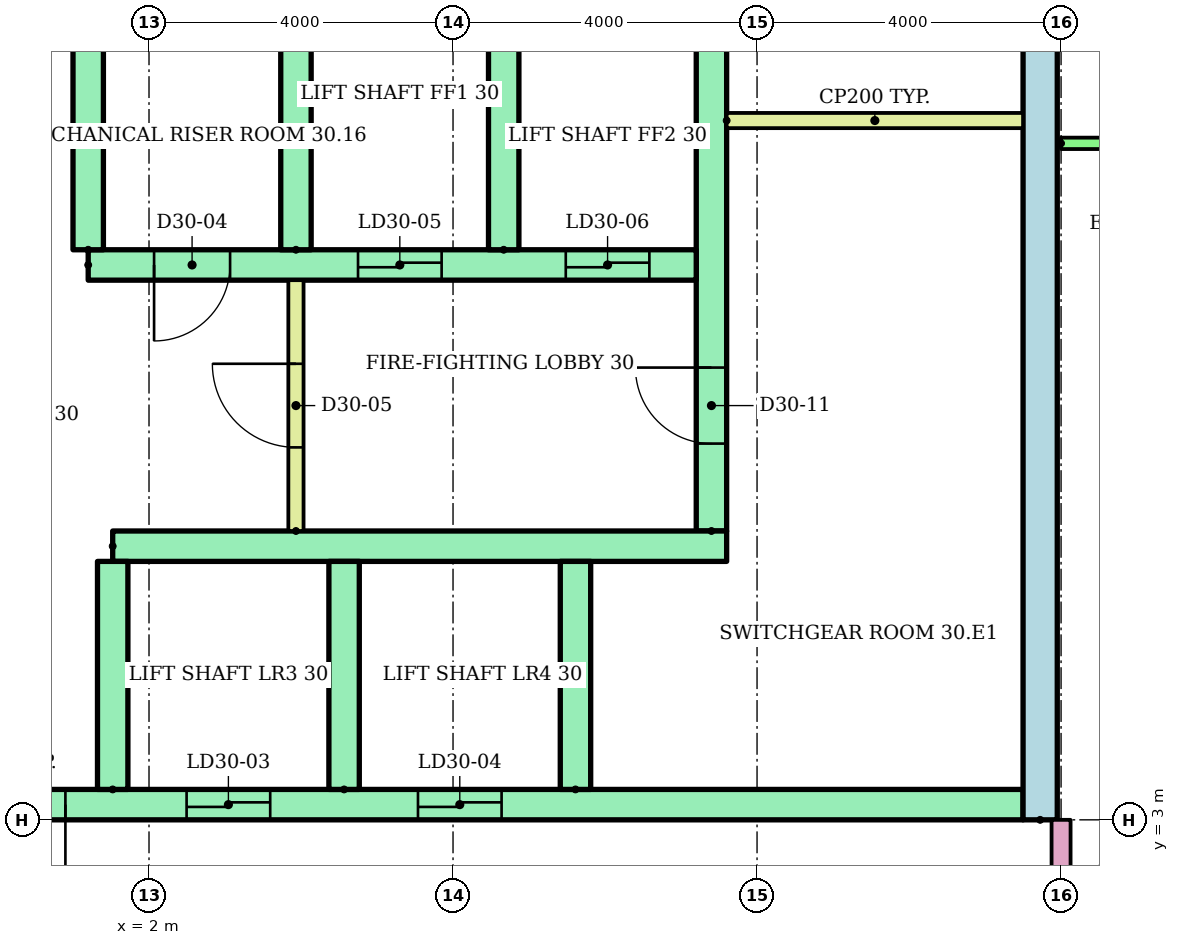
"""IFC4 building model, lengths in metres.
Left out: names, types, materials, properties, quantities, classifications, styles, units other than length and angle.
Written with IfcOpenShell. Run it as: python <this file> out.ifc"""

import sys

from ifc_helpers import new_model, si_unit, direction, frame, frame_2d, origin, place, context, subcontext, project, spatial, rectangle, extrude, element, fill, save


model = new_model("IFC4")
c1 = context("Model", 3, precision=1e-05, world=origin(), true_north=direction((0.0, 1.0)))
c2 = subcontext(c1, "Body", "Model", "MODEL_VIEW")
j1 = project(units=[si_unit("LENGTHUNIT", "METRE"), si_unit("PLANEANGLEUNIT", "RADIAN")], contexts=[c1])
p1 = place(None, origin())
s1 = spatial("IfcSite", under=j1, at=p1, CompositionType="ELEMENT")
p2 = place(p1, origin())
s2 = spatial("IfcBuilding", under=s1, at=p2, CompositionType="ELEMENT")
p3 = place(p2, frame((0.0, 0.0, 119.8)))
s3 = spatial("IfcBuildingStorey", under=s2, at=p3, CompositionType="ELEMENT", Elevation=119.8)
p4 = place(p3, frame((13.725, 3.0, 0.0), z_axis=(0.0, 0.0, 1.0), x_axis=(0.0, 1.0, 0.0)))
e1 = element("IfcWall", 1, at=p4, inside=s3, PredefinedType="SHEAR", context=c2, shape_type="SweptSolid", body=[
    extrude(rectangle(XDim=17.0, YDim=0.45, at=frame_2d((8.5, 0.0))), origin(), (0.0, 0.0, 1.0), 2.92),
])
p5 = place(p3, frame((9.4, 6.8, 0.0), z_axis=(0.0, 0.0, 1.0), x_axis=(0.0, 1.0, 0.0)))
e2 = element("IfcWall", 2, at=p5, inside=s3, PredefinedType="SHEAR", context=c2, shape_type="SweptSolid", body=[
    extrude(rectangle(XDim=12.7, YDim=0.4, at=frame_2d((6.35, 0.0))), origin(), (0.0, 0.0, 1.0), 2.92),
])
p6 = place(p5, frame((1.15, 0.0, 0.0)))
e3 = element("IfcOpeningElement", 3, at=p6, cuts=e2, PredefinedType="OPENING", context=c2, shape_type="SweptSolid", body=[
    extrude(rectangle(XDim=1.0, YDim=2.1, at=frame_2d((0.5, 1.05))), frame((0.0, 0.21, 0.0), z_axis=(0.0, -1.0, 0.0), x_axis=(1.0, 0.0, 0.0)), (0.0, 0.0, 1.0), 0.42),
])
p7 = place(p5, frame((7.925, 0.0, 0.0)))
e4 = element("IfcOpeningElement", 4, at=p7, cuts=e2, PredefinedType="OPENING", context=c2, shape_type="SweptSolid", body=[
    extrude(rectangle(XDim=1.0, YDim=2.1, at=frame_2d((0.5, 1.05))), frame((0.0, 0.21, 0.0), z_axis=(0.0, -1.0, 0.0), x_axis=(1.0, 0.0, 0.0)), (0.0, 0.0, 1.0), 0.42),
])
p8 = place(p3, frame((-13.5, 3.2, 0.0)))
e5 = element("IfcWall", 5, at=p8, inside=s3, PredefinedType="SHEAR", context=c2, shape_type="SweptSolid", body=[
    extrude(rectangle(XDim=27.0, YDim=0.4, at=frame_2d((13.5, 0.0))), origin(), (0.0, 0.0, 1.0), 2.92),
])
p9 = place(p8, frame((6.861, 0.0, 0.0)))
e6 = element("IfcOpeningElement", 6, at=p9, cuts=e5, PredefinedType="OPENING", context=c2, shape_type="SweptSolid", body=[
    extrude(rectangle(XDim=1.1, YDim=2.1, at=frame_2d((0.55, 1.05))), frame((0.0, 0.21, 0.0), z_axis=(0.0, -1.0, 0.0), x_axis=(1.0, 0.0, 0.0)), (0.0, 0.0, 1.0), 0.42),
])
p10 = place(p8, frame((9.906, 0.0, 0.0)))
e7 = element("IfcOpeningElement", 7, at=p10, cuts=e5, PredefinedType="OPENING", context=c2, shape_type="SweptSolid", body=[
    extrude(rectangle(XDim=1.1, YDim=2.1, at=frame_2d((0.55, 1.05))), frame((0.0, 0.21, 0.0), z_axis=(0.0, -1.0, 0.0), x_axis=(1.0, 0.0, 0.0)), (0.0, 0.0, 1.0), 0.42),
])
p11 = place(p8, frame((15.994, 0.0, 0.0)))
e8 = element("IfcOpeningElement", 8, at=p11, cuts=e5, PredefinedType="OPENING", context=c2, shape_type="SweptSolid", body=[
    extrude(rectangle(XDim=1.1, YDim=2.1, at=frame_2d((0.55, 1.05))), frame((0.0, 0.21, 0.0), z_axis=(0.0, -1.0, 0.0), x_axis=(1.0, 0.0, 0.0)), (0.0, 0.0, 1.0), 0.42),
])
p12 = place(p8, frame((19.039, 0.0, 0.0)))
e9 = element("IfcOpeningElement", 9, at=p12, cuts=e5, PredefinedType="OPENING", context=c2, shape_type="SweptSolid", body=[
    extrude(rectangle(XDim=1.1, YDim=2.1, at=frame_2d((0.55, 1.05))), frame((0.0, 0.21, 0.0), z_axis=(0.0, -1.0, 0.0), x_axis=(1.0, 0.0, 0.0)), (0.0, 0.0, 1.0), 0.42),
])
p13 = place(p8, frame((12.6, 0.0, 0.0)))
e10 = element("IfcOpeningElement", 10, at=p13, cuts=e5, PredefinedType="OPENING", context=c2, shape_type="SweptSolid", body=[
    extrude(rectangle(XDim=1.8, YDim=2.1, at=frame_2d((0.9, 1.05))), frame((0.0, 0.21, 0.0), z_axis=(0.0, -1.0, 0.0), x_axis=(1.0, 0.0, 0.0)), (0.0, 0.0, 1.0), 0.42),
])
p14 = place(p3, frame((1.522, 6.6, 0.0)))
e11 = element("IfcWall", 11, at=p14, inside=s3, PredefinedType="SHEAR", context=c2, shape_type="SweptSolid", body=[
    extrude(rectangle(XDim=8.078, YDim=0.4, at=frame_2d((4.039, 0.0))), origin(), (0.0, 0.0, 1.0), 2.92),
])
for number, where, z_axis, x_axis in (
    (12, (1.522, 3.4, 0.0), (0.0, 0.0, 1.0), (0.0, 1.0, 0.0)),
    (13, (4.567, 3.4, 0.0), (0.0, 0.0, 1.0), (0.0, 1.0, 0.0)),
    (14, (7.611, 3.4, 0.0), (0.0, 0.0, 1.0), (0.0, 1.0, 0.0)),
):
    element("IfcWall", number, at=place(p3, frame(where, z_axis=z_axis, x_axis=x_axis)), inside=s3, PredefinedType="SHEAR", context=c2, shape_type="SweptSolid", body=[
        extrude(rectangle(XDim=3.0, YDim=0.4, at=frame_2d((1.5, 0.0))), origin(), (0.0, 0.0, 1.0), 2.92),
    ])
p15 = place(p3, frame((1.2, 10.3, 0.0)))
e15 = element("IfcWall", 15, at=p15, inside=s3, PredefinedType="SHEAR", context=c2, shape_type="SweptSolid", body=[
    extrude(rectangle(XDim=8.0, YDim=0.4, at=frame_2d((4.0, 0.0))), origin(), (0.0, 0.0, 1.0), 2.92),
])
p16 = place(p15, frame((3.55, 0.0, 0.0)))
e16 = element("IfcOpeningElement", 16, at=p16, cuts=e15, PredefinedType="OPENING", context=c2, shape_type="SweptSolid", body=[
    extrude(rectangle(XDim=1.1, YDim=2.1, at=frame_2d((0.55, 1.05))), frame((0.0, 0.21, 0.0), z_axis=(0.0, -1.0, 0.0), x_axis=(1.0, 0.0, 0.0)), (0.0, 0.0, 1.0), 0.42),
])
p17 = place(p15, frame((6.283, 0.0, 0.0)))
e17 = element("IfcOpeningElement", 17, at=p17, cuts=e15, PredefinedType="OPENING", context=c2, shape_type="SweptSolid", body=[
    extrude(rectangle(XDim=1.1, YDim=2.1, at=frame_2d((0.55, 1.05))), frame((0.0, 0.21, 0.0), z_axis=(0.0, -1.0, 0.0), x_axis=(1.0, 0.0, 0.0)), (0.0, 0.0, 1.0), 0.42),
])
p18 = place(p15, frame((0.867, 0.0, 0.0)))
e18 = element("IfcOpeningElement", 18, at=p18, cuts=e15, PredefinedType="OPENING", context=c2, shape_type="SweptSolid", body=[
    extrude(rectangle(XDim=1.0, YDim=2.1, at=frame_2d((0.5, 1.05))), frame((0.0, 0.21, 0.0), z_axis=(0.0, -1.0, 0.0), x_axis=(1.0, 0.0, 0.0)), (0.0, 0.0, 1.0), 0.42),
])
for number, where, z_axis, x_axis in (
    (19, (1.2, 10.5, 0.0), (0.0, 0.0, 1.0), (0.0, 1.0, 0.0)),
    (20, (3.933, 10.5, 0.0), (0.0, 0.0, 1.0), (0.0, 1.0, 0.0)),
    (21, (6.667, 10.5, 0.0), (0.0, 0.0, 1.0), (0.0, 1.0, 0.0)),
):
    element("IfcWall", number, at=place(p3, frame(where, z_axis=z_axis, x_axis=x_axis)), inside=s3, PredefinedType="SHEAR", context=c2, shape_type="SweptSolid", body=[
        extrude(rectangle(XDim=3.0, YDim=0.4, at=frame_2d((1.5, 0.0))), origin(), (0.0, 0.0, 1.0), 2.92),
    ])
p19 = place(p3, frame((3.933, 6.8, 0.0), z_axis=(0.0, 0.0, 1.0), x_axis=(0.0, 1.0, 0.0)))
e22 = element("IfcWall", 22, at=p19, inside=s3, PredefinedType="PARTITIONING", context=c2, shape_type="SweptSolid", body=[
    extrude(rectangle(XDim=3.3, YDim=0.2, at=frame_2d((1.65, 0.0))), origin(), (0.0, 0.0, 1.0), 2.92),
])
p20 = place(p19, frame((1.1, 0.0, 0.0)))
e23 = element("IfcOpeningElement", 23, at=p20, cuts=e22, PredefinedType="OPENING", context=c2, shape_type="SweptSolid", body=[
    extrude(rectangle(XDim=1.1, YDim=2.1, at=frame_2d((0.55, 1.05))), frame((0.0, 0.11, 0.0), z_axis=(0.0, -1.0, 0.0), x_axis=(1.0, 0.0, 0.0)), (0.0, 0.0, 1.0), 0.22),
])
p21 = place(p3, frame((9.6, 12.2, 0.0)))
e24 = element("IfcWall", 24, at=p21, inside=s3, PredefinedType="PARTITIONING", context=c2, shape_type="SweptSolid", body=[
    extrude(rectangle(XDim=3.9, YDim=0.2, at=frame_2d((1.95, 0.0))), origin(), (0.0, 0.0, 1.0), 2.92),
])
p22 = place(p3, frame((14.0, 11.9, 0.0)))
e25 = element("IfcWall", 25, at=p22, inside=s3, PredefinedType="PARTITIONING", context=c2, shape_type="SweptSolid", body=[
    extrude(rectangle(XDim=18.72, YDim=0.15, at=frame_2d((9.36, 0.0))), origin(), (0.0, 0.0, 1.0), 2.4),
])
p23 = place(p22, frame((5.5, 0.0, 0.0)))
e26 = element("IfcOpeningElement", 26, at=p23, cuts=e25, PredefinedType="OPENING", context=c2, shape_type="SweptSolid", body=[
    extrude(rectangle(XDim=1.0, YDim=2.1, at=frame_2d((0.5, 1.05))), frame((0.0, 0.085, 0.0), z_axis=(0.0, -1.0, 0.0), x_axis=(1.0, 0.0, 0.0)), (0.0, 0.0, 1.0), 0.17),
])
p24 = place(p22, frame((14.8, 0.0, 0.0)))
e27 = element("IfcOpeningElement", 27, at=p24, cuts=e25, PredefinedType="OPENING", context=c2, shape_type="SweptSolid", body=[
    extrude(rectangle(XDim=0.9, YDim=2.1, at=frame_2d((0.45, 1.05))), frame((0.0, 0.085, 0.0), z_axis=(0.0, -1.0, 0.0), x_axis=(1.0, 0.0, 0.0)), (0.0, 0.0, 1.0), 0.17),
])
p25 = place(p3, frame((14.0, 1.4, 0.0), z_axis=(0.0, 0.0, 1.0), x_axis=(0.0, 1.0, 0.0)))
e28 = element("IfcWall", 28, at=p25, inside=s3, PredefinedType="PARTITIONING", context=c2, shape_type="SweptSolid", body=[
    extrude(rectangle(XDim=1.6, YDim=0.25, at=frame_2d((0.8, 0.0))), origin(), (0.0, 0.0, 1.0), 2.4),
])
p26 = place(p11, origin())
e29 = element("IfcDoor", 29, at=p26, inside=s3, OperationType="SLIDING_TO_LEFT", PredefinedType="DOOR", context=c2, shape_type="SweptSolid", body=[
    extrude(rectangle(XDim=1.1, YDim=2.1, at=frame_2d((0.55, 1.05))), frame((0.0, 0.025, 0.0), z_axis=(0.0, -1.0, 0.0), x_axis=(1.0, 0.0, 0.0)), (0.0, 0.0, 1.0), 0.05),
])
fill(e8, e29)
p27 = place(p12, origin())
e30 = element("IfcDoor", 30, at=p27, inside=s3, OperationType="SLIDING_TO_LEFT", PredefinedType="DOOR", context=c2, shape_type="SweptSolid", body=[
    extrude(rectangle(XDim=1.1, YDim=2.1, at=frame_2d((0.55, 1.05))), frame((0.0, 0.025, 0.0), z_axis=(0.0, -1.0, 0.0), x_axis=(1.0, 0.0, 0.0)), (0.0, 0.0, 1.0), 0.05),
])
fill(e9, e30)
p28 = place(p13, frame((1.8, 0.0, 0.0), z_axis=(0.0, 0.0, 1.0), x_axis=(-1.0, 0.0, 0.0)))
e31 = element("IfcDoor", 31, at=p28, inside=s3, OperationType="DOUBLE_DOOR_SINGLE_SWING", PredefinedType="DOOR", context=c2, shape_type="SweptSolid", body=[
    extrude(rectangle(XDim=1.8, YDim=2.1, at=frame_2d((0.9, 1.05))), frame((0.0, 0.025, 0.0), z_axis=(0.0, -1.0, 0.0), x_axis=(1.0, 0.0, 0.0)), (0.0, 0.0, 1.0), 0.05),
])
fill(e10, e31)
p29 = place(p16, origin())
e32 = element("IfcDoor", 32, at=p29, inside=s3, OperationType="SLIDING_TO_LEFT", PredefinedType="DOOR", context=c2, shape_type="SweptSolid", body=[
    extrude(rectangle(XDim=1.1, YDim=2.1, at=frame_2d((0.55, 1.05))), frame((0.0, 0.025, 0.0), z_axis=(0.0, -1.0, 0.0), x_axis=(1.0, 0.0, 0.0)), (0.0, 0.0, 1.0), 0.05),
])
fill(e16, e32)
p30 = place(p17, origin())
e33 = element("IfcDoor", 33, at=p30, inside=s3, OperationType="SLIDING_TO_LEFT", PredefinedType="DOOR", context=c2, shape_type="SweptSolid", body=[
    extrude(rectangle(XDim=1.1, YDim=2.1, at=frame_2d((0.55, 1.05))), frame((0.0, 0.025, 0.0), z_axis=(0.0, -1.0, 0.0), x_axis=(1.0, 0.0, 0.0)), (0.0, 0.0, 1.0), 0.05),
])
fill(e17, e33)
p31 = place(p18, frame((1.0, 0.0, 0.0), z_axis=(0.0, 0.0, 1.0), x_axis=(-1.0, 0.0, 0.0)))
e34 = element("IfcDoor", 34, at=p31, inside=s3, OperationType="SINGLE_SWING_LEFT", PredefinedType="DOOR", context=c2, shape_type="SweptSolid", body=[
    extrude(rectangle(XDim=1.0, YDim=2.1, at=frame_2d((0.5, 1.05))), frame((0.0, 0.025, 0.0), z_axis=(0.0, -1.0, 0.0), x_axis=(1.0, 0.0, 0.0)), (0.0, 0.0, 1.0), 0.05),
])
fill(e18, e34)
p32 = place(p20, origin())
e35 = element("IfcDoor", 35, at=p32, inside=s3, OperationType="SINGLE_SWING_RIGHT", PredefinedType="DOOR", context=c2, shape_type="SweptSolid", body=[
    extrude(rectangle(XDim=1.1, YDim=2.1, at=frame_2d((0.55, 1.05))), frame((0.0, 0.025, 0.0), z_axis=(0.0, -1.0, 0.0), x_axis=(1.0, 0.0, 0.0)), (0.0, 0.0, 1.0), 0.05),
])
fill(e23, e35)
p33 = place(p6, origin())
e36 = element("IfcDoor", 36, at=p33, inside=s3, OperationType="SINGLE_SWING_RIGHT", PredefinedType="DOOR", context=c2, shape_type="SweptSolid", body=[
    extrude(rectangle(XDim=1.0, YDim=2.1, at=frame_2d((0.5, 1.05))), frame((0.0, 0.025, 0.0), z_axis=(0.0, -1.0, 0.0), x_axis=(1.0, 0.0, 0.0)), (0.0, 0.0, 1.0), 0.05),
])
fill(e3, e36)
save(model, sys.argv[1])
